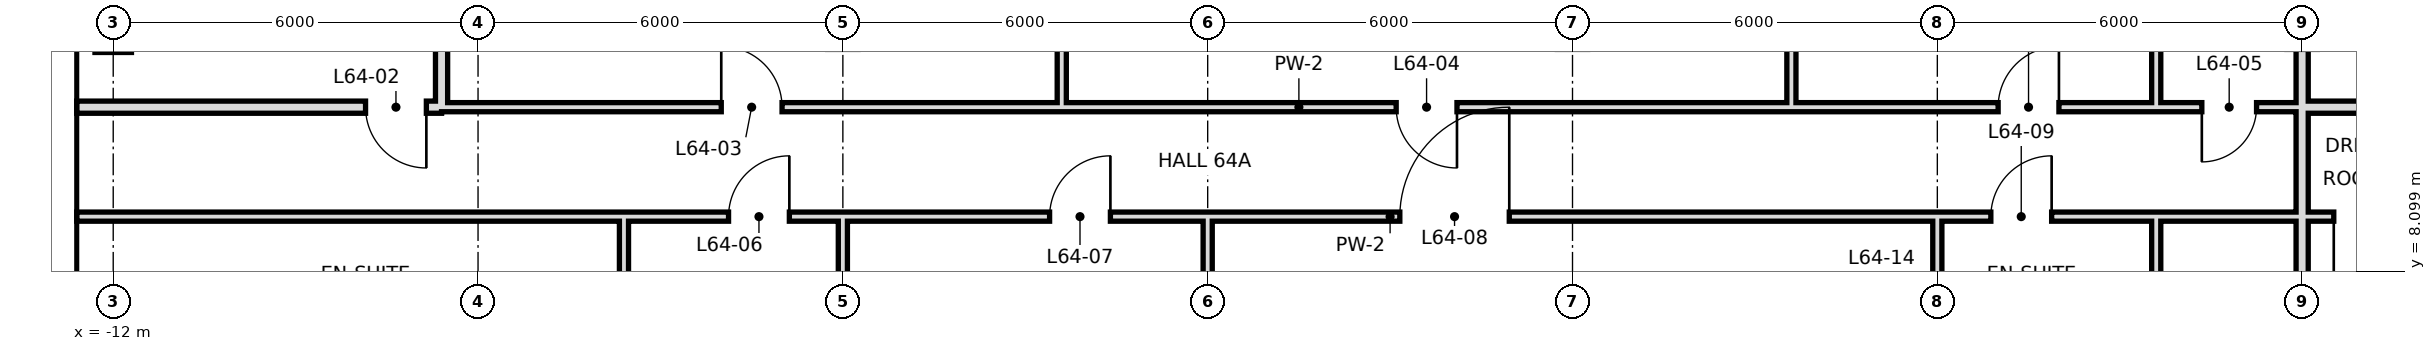
"""IFC4 building model, lengths in metres.
Left out: names, types, materials, properties, quantities, classifications, styles, units other than length and angle.
Written with IfcOpenShell. Run it as: python <this file> out.ifc"""

import sys

from ifc_helpers import new_model, si_unit, direction, frame, frame_2d, origin, place, context, subcontext, project, spatial, rectangle, extrude, element, fill, save


model = new_model("IFC4")
c1 = context("Model", 3, precision=1e-05, world=origin(), true_north=direction((0.0, 1.0)))
c2 = subcontext(c1, "Body", "Model", "MODEL_VIEW")
j1 = project(units=[si_unit("LENGTHUNIT", "METRE"), si_unit("PLANEANGLEUNIT", "RADIAN")], contexts=[c1])
p1 = place(None, origin())
s1 = spatial("IfcSite", under=j1, at=p1, CompositionType="ELEMENT")
p2 = place(p1, origin())
s2 = spatial("IfcBuilding", under=s1, at=p2, CompositionType="ELEMENT")
p3 = place(p2, frame((0.0, 0.0, 270.2)))
s3 = spatial("IfcBuildingStorey", under=s2, at=p3, CompositionType="ELEMENT", Elevation=270.2)
p4 = place(p3, frame((-3.6, 6.0, 0.0), z_axis=(0.0, 0.0, 1.0), x_axis=(0.0, 1.0, 0.0)))
e1 = element("IfcWall", 1, at=p4, inside=s3, PredefinedType="PARTITIONING", context=c2, shape_type="SweptSolid", body=[
    extrude(rectangle(XDim=3.0, YDim=0.15, at=frame_2d((1.5, 0.0))), origin(), (0.0, 0.0, 1.0), 3.42),
])
p5 = place(p3, frame((-6.6, 10.8, 0.0), z_axis=(0.0, 0.0, 1.0), x_axis=(0.0, 1.0, 0.0)))
e2 = element("IfcWall", 2, at=p5, inside=s3, PredefinedType="SOLIDWALL", context=c2, shape_type="SweptSolid", body=[
    extrude(rectangle(XDim=7.2, YDim=0.2, at=frame_2d((3.6, 0.0))), origin(), (0.0, 0.0, 1.0), 2.72),
])
p6 = place(p3, frame((0.0, 0.0, 0.0), z_axis=(0.0, 0.0, 1.0), x_axis=(0.0, 1.0, 0.0)))
e3 = element("IfcWall", 3, at=p6, inside=s3, PredefinedType="PARTITIONING", context=c2, shape_type="SweptSolid", body=[
    extrude(rectangle(XDim=9.0, YDim=0.15, at=frame_2d((4.5, 0.0))), origin(), (0.0, 0.0, 1.0), 2.72),
])
p7 = place(p3, frame((15.6, 10.8, 0.0), z_axis=(0.0, 0.0, 1.0), x_axis=(0.0, 1.0, 0.0)))
e4 = element("IfcWall", 4, at=p7, inside=s3, PredefinedType="PARTITIONING", context=c2, shape_type="SweptSolid", body=[
    extrude(rectangle(XDim=7.9, YDim=0.15, at=frame_2d((3.95, 0.0))), origin(), (0.0, 0.0, 1.0), 3.42),
])
p8 = place(p3, frame((18.0, -0.6, 0.0), z_axis=(0.0, 0.0, 1.0), x_axis=(0.0, 1.0, 0.0)))
e5 = element("IfcWall", 5, at=p8, inside=s3, PredefinedType="PARTITIONING", context=c2, shape_type="SweptSolid", body=[
    extrude(rectangle(XDim=9.6, YDim=0.15, at=frame_2d((4.8, 0.0))), origin(), (0.0, 0.0, 1.0), 2.72),
])
p9 = place(p3, frame((21.6, 6.0, 0.0), z_axis=(0.0, 0.0, 1.0), x_axis=(0.0, 1.0, 0.0)))
e6 = element("IfcWall", 6, at=p9, inside=s3, PredefinedType="PARTITIONING", context=c2, shape_type="SweptSolid", body=[
    extrude(rectangle(XDim=3.0, YDim=0.15, at=frame_2d((1.5, 0.0))), origin(), (0.0, 0.0, 1.0), 3.42),
])
p10 = place(p3, frame((21.6, 10.8, 0.0), z_axis=(0.0, 0.0, 1.0), x_axis=(0.0, 1.0, 0.0)))
e7 = element("IfcWall", 7, at=p10, inside=s3, PredefinedType="PARTITIONING", context=c2, shape_type="SweptSolid", body=[
    extrude(rectangle(XDim=7.9, YDim=0.15, at=frame_2d((3.95, 0.0))), origin(), (0.0, 0.0, 1.0), 3.42),
])
p11 = place(p3, frame((24.0, 10.8, 0.0), z_axis=(0.0, 0.0, 1.0), x_axis=(0.0, 1.0, 0.0)))
e8 = element("IfcWall", 8, at=p11, inside=s3, PredefinedType="SOLIDWALL", context=c2, shape_type="SweptSolid", body=[
    extrude(rectangle(XDim=7.9, YDim=0.2, at=frame_2d((3.95, 0.0))), origin(), (0.0, 0.0, 1.0), 2.72),
])
p12 = place(p3, frame((24.0, 0.0, 0.0), z_axis=(0.0, 0.0, 1.0), x_axis=(0.0, 1.0, 0.0)))
e9 = element("IfcWall", 9, at=p12, inside=s3, PredefinedType="SOLIDWALL", context=c2, shape_type="SweptSolid", body=[
    extrude(rectangle(XDim=10.8, YDim=0.2, at=frame_2d((5.4, 0.0))), origin(), (0.0, 0.0, 1.0), 2.72),
])
p13 = place(p3, frame((3.6, 10.8, 0.0), z_axis=(0.0, 0.0, 1.0), x_axis=(0.0, 1.0, 0.0)))
e10 = element("IfcWall", 10, at=p13, inside=s3, PredefinedType="PARTITIONING", context=c2, shape_type="SweptSolid", body=[
    extrude(rectangle(XDim=7.9, YDim=0.15, at=frame_2d((3.95, 0.0))), origin(), (0.0, 0.0, 1.0), 3.42),
])
p14 = place(p3, frame((6.0, -0.6, 0.0), z_axis=(0.0, 0.0, 1.0), x_axis=(0.0, 1.0, 0.0)))
e11 = element("IfcWall", 11, at=p14, inside=s3, PredefinedType="PARTITIONING", context=c2, shape_type="SweptSolid", body=[
    extrude(rectangle(XDim=9.6, YDim=0.15, at=frame_2d((4.8, 0.0))), origin(), (0.0, 0.0, 1.0), 2.72),
])
p15 = place(p3, frame((-12.6, 10.8, 0.0), z_axis=(0.0, 0.0, 1.0), x_axis=(1.0, 0.0, 0.0)))
e12 = element("IfcWall", 12, at=p15, inside=s3, PredefinedType="SOLIDWALL", context=c2, shape_type="SweptSolid", body=[
    extrude(rectangle(XDim=6.0, YDim=0.2, at=frame_2d((3.0, 0.0))), origin(), (0.0, 0.0, 1.0), 2.97),
])
p16 = place(p15, frame((4.75, 0.0, 0.0)))
e13 = element("IfcOpeningElement", 13, at=p16, cuts=e12, PredefinedType="OPENING", context=c2, shape_type="SweptSolid", body=[
    extrude(rectangle(XDim=1.0, YDim=2.4, at=frame_2d((0.5, 1.2))), frame((0.0, 0.11, 0.0), z_axis=(0.0, -1.0, 0.0), x_axis=(1.0, 0.0, 0.0)), (0.0, 0.0, 1.0), 0.22),
])
p17 = place(p3, frame((24.0, 10.8, 0.0), z_axis=(0.0, 0.0, 1.0), x_axis=(1.0, 0.0, 0.0)))
e14 = element("IfcWall", 14, at=p17, inside=s3, PredefinedType="SOLIDWALL", context=c2, shape_type="SweptSolid", body=[
    extrude(rectangle(XDim=3.6, YDim=0.2, at=frame_2d((1.8, 0.0))), origin(), (0.0, 0.0, 1.0), 2.72),
])
p18 = place(p17, frame((1.3, 0.0, 0.0)))
e15 = element("IfcOpeningElement", 15, at=p18, cuts=e14, PredefinedType="OPENING", context=c2, shape_type="SweptSolid", body=[
    extrude(rectangle(XDim=1.0, YDim=2.4, at=frame_2d((0.5, 1.2))), frame((0.0, 0.11, 0.0), z_axis=(0.0, -1.0, 0.0), x_axis=(1.0, 0.0, 0.0)), (0.0, 0.0, 1.0), 0.22),
])
p19 = place(p3, frame((-6.6, 10.8, 0.0), z_axis=(0.0, 0.0, 1.0), x_axis=(1.0, 0.0, 0.0)))
e16 = element("IfcWall", 16, at=p19, inside=s3, PredefinedType="PARTITIONING", context=c2, shape_type="SweptSolid", body=[
    extrude(rectangle(XDim=28.2, YDim=0.15, at=frame_2d((14.1, 0.0))), origin(), (0.0, 0.0, 1.0), 3.42),
])
p20 = place(p19, frame((25.6, 0.0, 0.0)))
e17 = element("IfcOpeningElement", 17, at=p20, cuts=e16, PredefinedType="OPENING", context=c2, shape_type="SweptSolid", body=[
    extrude(rectangle(XDim=1.0, YDim=2.4, at=frame_2d((0.5, 1.2))), frame((0.0, 0.085, 0.0), z_axis=(0.0, -1.0, 0.0), x_axis=(1.0, 0.0, 0.0)), (0.0, 0.0, 1.0), 0.17),
])
p21 = place(p19, frame((4.6, 0.0, 0.0)))
e18 = element("IfcOpeningElement", 18, at=p21, cuts=e16, PredefinedType="OPENING", context=c2, shape_type="SweptSolid", body=[
    extrude(rectangle(XDim=1.0, YDim=2.4, at=frame_2d((0.5, 1.2))), frame((0.0, 0.085, 0.0), z_axis=(0.0, -1.0, 0.0), x_axis=(1.0, 0.0, 0.0)), (0.0, 0.0, 1.0), 0.17),
])
p22 = place(p19, frame((15.7, 0.0, 0.0)))
e19 = element("IfcOpeningElement", 19, at=p22, cuts=e16, PredefinedType="OPENING", context=c2, shape_type="SweptSolid", body=[
    extrude(rectangle(XDim=1.0, YDim=2.4, at=frame_2d((0.5, 1.2))), frame((0.0, 0.085, 0.0), z_axis=(0.0, -1.0, 0.0), x_axis=(1.0, 0.0, 0.0)), (0.0, 0.0, 1.0), 0.17),
])
p23 = place(p3, frame((21.6, 10.8, 0.0), z_axis=(0.0, 0.0, 1.0), x_axis=(1.0, 0.0, 0.0)))
e20 = element("IfcWall", 20, at=p23, inside=s3, PredefinedType="PARTITIONING", context=c2, shape_type="SweptSolid", body=[
    extrude(rectangle(XDim=2.4, YDim=0.15, at=frame_2d((1.2, 0.0))), origin(), (0.0, 0.0, 1.0), 3.42),
])
p24 = place(p23, frame((0.75, 0.0, 0.0)))
e21 = element("IfcOpeningElement", 21, at=p24, cuts=e20, PredefinedType="OPENING", context=c2, shape_type="SweptSolid", body=[
    extrude(rectangle(XDim=0.9, YDim=2.4, at=frame_2d((0.45, 1.2))), frame((0.0, 0.085, 0.0), z_axis=(0.0, -1.0, 0.0), x_axis=(1.0, 0.0, 0.0)), (0.0, 0.0, 1.0), 0.17),
])
p25 = place(p3, frame((-3.6, 9.0, 0.0), z_axis=(0.0, 0.0, 1.0), x_axis=(1.0, 0.0, 0.0)))
e22 = element("IfcWall", 22, at=p25, inside=s3, PredefinedType="PARTITIONING", context=c2, shape_type="SweptSolid", body=[
    extrude(rectangle(XDim=25.2, YDim=0.15, at=frame_2d((12.6, 0.0))), origin(), (0.0, 0.0, 1.0), 3.42),
])
p26 = place(p25, frame((1.72, 0.0, 0.0)))
e23 = element("IfcOpeningElement", 23, at=p26, cuts=e22, PredefinedType="OPENING", context=c2, shape_type="SweptSolid", body=[
    extrude(rectangle(XDim=1.0, YDim=2.4, at=frame_2d((0.5, 1.2))), frame((0.0, 0.085, 0.0), z_axis=(0.0, -1.0, 0.0), x_axis=(1.0, 0.0, 0.0)), (0.0, 0.0, 1.0), 0.17),
])
p27 = place(p25, frame((7.0, 0.0, 0.0)))
e24 = element("IfcOpeningElement", 24, at=p27, cuts=e22, PredefinedType="OPENING", context=c2, shape_type="SweptSolid", body=[
    extrude(rectangle(XDim=1.0, YDim=2.4, at=frame_2d((0.5, 1.2))), frame((0.0, 0.085, 0.0), z_axis=(0.0, -1.0, 0.0), x_axis=(1.0, 0.0, 0.0)), (0.0, 0.0, 1.0), 0.17),
])
p28 = place(p25, frame((12.76, 0.0, 0.0)))
e25 = element("IfcOpeningElement", 25, at=p28, cuts=e22, PredefinedType="OPENING", context=c2, shape_type="SweptSolid", body=[
    extrude(rectangle(XDim=1.8, YDim=2.4, at=frame_2d((0.9, 1.2))), frame((0.0, 0.085, 0.0), z_axis=(0.0, -1.0, 0.0), x_axis=(1.0, 0.0, 0.0)), (0.0, 0.0, 1.0), 0.17),
])
p29 = place(p25, frame((22.48, 0.0, 0.0)))
e26 = element("IfcOpeningElement", 26, at=p29, cuts=e22, PredefinedType="OPENING", context=c2, shape_type="SweptSolid", body=[
    extrude(rectangle(XDim=1.0, YDim=2.4, at=frame_2d((0.5, 1.2))), frame((0.0, 0.085, 0.0), z_axis=(0.0, -1.0, 0.0), x_axis=(1.0, 0.0, 0.0)), (0.0, 0.0, 1.0), 0.17),
])
p30 = place(p3, frame((24.0, 9.0, 0.0), z_axis=(0.0, 0.0, 1.0), x_axis=(1.0, 0.0, 0.0)))
e27 = element("IfcWall", 27, at=p30, inside=s3, PredefinedType="PARTITIONING", context=c2, shape_type="SweptSolid", body=[
    extrude(rectangle(XDim=2.4, YDim=0.15, at=frame_2d((1.2, 0.0))), origin(), (0.0, 0.0, 1.0), 3.42),
])
p31 = place(p30, frame((0.52, 0.0, 0.0)))
e28 = element("IfcOpeningElement", 28, at=p31, cuts=e27, PredefinedType="OPENING", context=c2, shape_type="SweptSolid", body=[
    extrude(rectangle(XDim=1.0, YDim=2.4, at=frame_2d((0.5, 1.2))), frame((0.0, 0.085, 0.0), z_axis=(0.0, -1.0, 0.0), x_axis=(1.0, 0.0, 0.0)), (0.0, 0.0, 1.0), 0.17),
])
p32 = place(p3, frame((-12.6, 9.0, 0.0), z_axis=(0.0, 0.0, 1.0), x_axis=(1.0, 0.0, 0.0)))
e29 = element("IfcWall", 29, at=p32, inside=s3, PredefinedType="PARTITIONING", context=c2, shape_type="SweptSolid", body=[
    extrude(rectangle(XDim=9.0, YDim=0.15, at=frame_2d((4.5, 0.0))), origin(), (0.0, 0.0, 1.0), 3.42),
])
p33 = place(p3, frame((21.6, 9.0, 0.0), z_axis=(0.0, 0.0, 1.0), x_axis=(1.0, 0.0, 0.0)))
e30 = element("IfcWall", 30, at=p33, inside=s3, PredefinedType="PARTITIONING", context=c2, shape_type="SweptSolid", body=[
    extrude(rectangle(XDim=2.4, YDim=0.15, at=frame_2d((1.2, 0.0))), origin(), (0.0, 0.0, 1.0), 3.42),
])
p34 = place(p20, frame((1.0, 0.0, 0.0), z_axis=(0.0, 0.0, 1.0), x_axis=(-1.0, 0.0, 0.0)))
e31 = element("IfcDoor", 31, at=p34, inside=s3, OperationType="SINGLE_SWING_LEFT", PredefinedType="DOOR", context=c2, shape_type="SweptSolid", body=[
    extrude(rectangle(XDim=1.0, YDim=2.4, at=frame_2d((0.5, 1.2))), frame((0.0, 0.025, 0.0), z_axis=(0.0, -1.0, 0.0), x_axis=(1.0, 0.0, 0.0)), (0.0, 0.0, 1.0), 0.05),
])
fill(e17, e31)
p35 = place(p16, origin())
e32 = element("IfcDoor", 32, at=p35, inside=s3, OperationType="SINGLE_SWING_RIGHT", PredefinedType="DOOR", context=c2, shape_type="SweptSolid", body=[
    extrude(rectangle(XDim=1.0, YDim=2.4, at=frame_2d((0.5, 1.2))), frame((0.0, 0.025, 0.0), z_axis=(0.0, -1.0, 0.0), x_axis=(1.0, 0.0, 0.0)), (0.0, 0.0, 1.0), 0.05),
])
fill(e13, e32)
p36 = place(p21, origin())
e33 = element("IfcDoor", 33, at=p36, inside=s3, OperationType="SINGLE_SWING_LEFT", PredefinedType="DOOR", context=c2, shape_type="SweptSolid", body=[
    extrude(rectangle(XDim=1.0, YDim=2.4, at=frame_2d((0.5, 1.2))), frame((0.0, 0.025, 0.0), z_axis=(0.0, -1.0, 0.0), x_axis=(1.0, 0.0, 0.0)), (0.0, 0.0, 1.0), 0.05),
])
fill(e18, e33)
p37 = place(p22, origin())
e34 = element("IfcDoor", 34, at=p37, inside=s3, OperationType="SINGLE_SWING_RIGHT", PredefinedType="DOOR", context=c2, shape_type="SweptSolid", body=[
    extrude(rectangle(XDim=1.0, YDim=2.4, at=frame_2d((0.5, 1.2))), frame((0.0, 0.025, 0.0), z_axis=(0.0, -1.0, 0.0), x_axis=(1.0, 0.0, 0.0)), (0.0, 0.0, 1.0), 0.05),
])
fill(e19, e34)
p38 = place(p24, frame((0.9, 0.0, 0.0), z_axis=(0.0, 0.0, 1.0), x_axis=(-1.0, 0.0, 0.0)))
e35 = element("IfcDoor", 35, at=p38, inside=s3, OperationType="SINGLE_SWING_RIGHT", PredefinedType="DOOR", context=c2, shape_type="SweptSolid", body=[
    extrude(rectangle(XDim=0.9, YDim=2.4, at=frame_2d((0.45, 1.2))), frame((0.0, 0.025, 0.0), z_axis=(0.0, -1.0, 0.0), x_axis=(1.0, 0.0, 0.0)), (0.0, 0.0, 1.0), 0.05),
])
fill(e21, e35)
p39 = place(p26, frame((1.0, 0.0, 0.0), z_axis=(0.0, 0.0, 1.0), x_axis=(-1.0, 0.0, 0.0)))
e36 = element("IfcDoor", 36, at=p39, inside=s3, OperationType="SINGLE_SWING_LEFT", PredefinedType="DOOR", context=c2, shape_type="SweptSolid", body=[
    extrude(rectangle(XDim=1.0, YDim=2.4, at=frame_2d((0.5, 1.2))), frame((0.0, 0.025, 0.0), z_axis=(0.0, -1.0, 0.0), x_axis=(1.0, 0.0, 0.0)), (0.0, 0.0, 1.0), 0.05),
])
fill(e23, e36)
p40 = place(p27, frame((1.0, 0.0, 0.0), z_axis=(0.0, 0.0, 1.0), x_axis=(-1.0, 0.0, 0.0)))
e37 = element("IfcDoor", 37, at=p40, inside=s3, OperationType="SINGLE_SWING_LEFT", PredefinedType="DOOR", context=c2, shape_type="SweptSolid", body=[
    extrude(rectangle(XDim=1.0, YDim=2.4, at=frame_2d((0.5, 1.2))), frame((0.0, 0.025, 0.0), z_axis=(0.0, -1.0, 0.0), x_axis=(1.0, 0.0, 0.0)), (0.0, 0.0, 1.0), 0.05),
])
fill(e24, e37)
p41 = place(p28, frame((1.8, 0.0, 0.0), z_axis=(0.0, 0.0, 1.0), x_axis=(-1.0, 0.0, 0.0)))
e38 = element("IfcDoor", 38, at=p41, inside=s3, OperationType="SINGLE_SWING_LEFT", PredefinedType="DOOR", context=c2, shape_type="SweptSolid", body=[
    extrude(rectangle(XDim=1.8, YDim=2.4, at=frame_2d((0.9, 1.2))), frame((0.0, 0.025, 0.0), z_axis=(0.0, -1.0, 0.0), x_axis=(1.0, 0.0, 0.0)), (0.0, 0.0, 1.0), 0.05),
])
fill(e25, e38)
p42 = place(p29, frame((1.0, 0.0, 0.0), z_axis=(0.0, 0.0, 1.0), x_axis=(-1.0, 0.0, 0.0)))
e39 = element("IfcDoor", 39, at=p42, inside=s3, OperationType="SINGLE_SWING_LEFT", PredefinedType="DOOR", context=c2, shape_type="SweptSolid", body=[
    extrude(rectangle(XDim=1.0, YDim=2.4, at=frame_2d((0.5, 1.2))), frame((0.0, 0.025, 0.0), z_axis=(0.0, -1.0, 0.0), x_axis=(1.0, 0.0, 0.0)), (0.0, 0.0, 1.0), 0.05),
])
fill(e26, e39)
p43 = place(p31, frame((1.0, 0.0, 0.0), z_axis=(0.0, 0.0, 1.0), x_axis=(-1.0, 0.0, 0.0)))
e40 = element("IfcDoor", 40, at=p43, inside=s3, OperationType="SINGLE_SWING_RIGHT", PredefinedType="DOOR", context=c2, shape_type="SweptSolid", body=[
    extrude(rectangle(XDim=1.0, YDim=2.4, at=frame_2d((0.5, 1.2))), frame((0.0, 0.025, 0.0), z_axis=(0.0, -1.0, 0.0), x_axis=(1.0, 0.0, 0.0)), (0.0, 0.0, 1.0), 0.05),
])
fill(e28, e40)
save(model, sys.argv[1])
